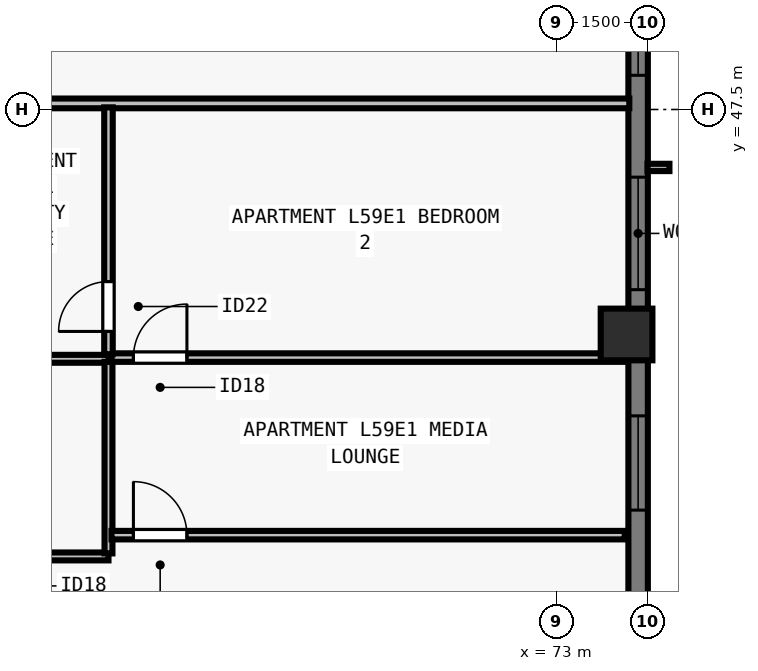
"""IFC4 building model, lengths in metres.
Left out: names, types, materials, properties, quantities, classifications, styles, units other than length and angle.
Written with IfcOpenShell. Run it as: python <this file> out.ifc"""

import sys

from ifc_helpers import new_model, si_unit, direction, frame, frame_2d, origin, origin_2d, place, context, subcontext, project, spatial, rectangle, extrude, element, fill, save


model = new_model("IFC4")
c1 = context("Model", 3, precision=1e-05, world=origin(), true_north=direction((0.0, 1.0)))
c2 = subcontext(c1, "Body", "Model", "MODEL_VIEW")
j1 = project(units=[si_unit("LENGTHUNIT", "METRE"), si_unit("PLANEANGLEUNIT", "RADIAN")], contexts=[c1])
p1 = place(None, origin())
s1 = spatial("IfcSite", under=j1, at=p1, CompositionType="ELEMENT")
p2 = place(p1, origin())
s2 = spatial("IfcBuilding", under=s1, at=p2, CompositionType="ELEMENT")
p3 = place(p2, frame((0.0, 0.0, 216.5)))
s3 = spatial("IfcBuildingStorey", under=s2, at=p3, CompositionType="ELEMENT", Elevation=216.5)
p4 = place(p3, frame((74.15, 43.8, 0.0), z_axis=(0.0, 0.0, 1.0), x_axis=(0.0, 1.0, 0.0)))
e1 = element("IfcColumn", 1, at=p4, inside=s3, PredefinedType="COLUMN", context=c2, shape_type="SweptSolid", body=[
    extrude(rectangle(XDim=0.85, YDim=0.85, at=origin_2d()), origin(), (0.0, 0.0, 1.0), 3.5),
])
p5 = place(p3, frame((74.34, 56.5, 0.0), z_axis=(0.0, 0.0, 1.0), x_axis=(0.0, -1.0, 0.0)))
e2 = element("IfcWall", 2, at=p5, inside=s3, PredefinedType="SOLIDWALL", context=c2, shape_type="SweptSolid", body=[
    extrude(rectangle(XDim=34.702, YDim=0.32, at=frame_2d((17.351, 0.0))), origin(), (0.0, 0.0, 1.0), 3.29),
])
p6 = place(p5, frame((6.888, 0.0, 0.8)))
e3 = element("IfcOpeningElement", 3, at=p6, cuts=e2, PredefinedType="OPENING", context=c2, shape_type="SweptSolid", body=[
    extrude(rectangle(XDim=1.55, YDim=1.678, at=frame_2d((0.775, 0.839))), frame((0.0, 0.17, 0.0), z_axis=(0.0, -1.0, 0.0), x_axis=(1.0, 0.0, 0.0)), (0.0, 0.0, 1.0), 0.34),
])
p7 = place(p5, frame((10.113, 0.0, 0.8)))
e4 = element("IfcOpeningElement", 4, at=p7, cuts=e2, PredefinedType="OPENING", context=c2, shape_type="SweptSolid", body=[
    extrude(rectangle(XDim=1.85, YDim=1.678, at=frame_2d((0.925, 0.839))), frame((0.0, 0.17, 0.0), z_axis=(0.0, -1.0, 0.0), x_axis=(1.0, 0.0, 0.0)), (0.0, 0.0, 1.0), 0.34),
])
p8 = place(p5, frame((14.038, 0.0, 0.8)))
e5 = element("IfcOpeningElement", 5, at=p8, cuts=e2, PredefinedType="OPENING", context=c2, shape_type="SweptSolid", body=[
    extrude(rectangle(XDim=1.55, YDim=1.678, at=frame_2d((0.775, 0.839))), frame((0.0, 0.17, 0.0), z_axis=(0.0, -1.0, 0.0), x_axis=(1.0, 0.0, 0.0)), (0.0, 0.0, 1.0), 0.34),
])
p9 = place(p5, frame((18.114, 0.0, 0.8)))
e6 = element("IfcOpeningElement", 6, at=p9, cuts=e2, PredefinedType="OPENING", context=c2, shape_type="SweptSolid", body=[
    extrude(rectangle(XDim=1.85, YDim=1.678, at=frame_2d((0.925, 0.839))), frame((0.0, 0.17, 0.0), z_axis=(0.0, -1.0, 0.0), x_axis=(1.0, 0.0, 0.0)), (0.0, 0.0, 1.0), 0.34),
])
p10 = place(p5, frame((23.614, 0.0, 0.8)))
e7 = element("IfcOpeningElement", 7, at=p10, cuts=e2, PredefinedType="OPENING", context=c2, shape_type="SweptSolid", body=[
    extrude(rectangle(XDim=1.85, YDim=1.678, at=frame_2d((0.925, 0.839))), frame((0.0, 0.17, 0.0), z_axis=(0.0, -1.0, 0.0), x_axis=(1.0, 0.0, 0.0)), (0.0, 0.0, 1.0), 0.34),
])
p11 = place(p5, frame((29.24, 0.0, 0.8)))
e8 = element("IfcOpeningElement", 8, at=p11, cuts=e2, PredefinedType="OPENING", context=c2, shape_type="SweptSolid", body=[
    extrude(rectangle(XDim=1.55, YDim=1.678, at=frame_2d((0.775, 0.839))), frame((0.0, 0.17, 0.0), z_axis=(0.0, -1.0, 0.0), x_axis=(1.0, 0.0, 0.0)), (0.0, 0.0, 1.0), 0.34),
])
p12 = place(p3, frame((62.865, 47.6, 0.0), z_axis=(0.0, 0.0, 1.0), x_axis=(1.0, 0.0, 0.0)))
e9 = element("IfcWall", 9, at=p12, inside=s3, PredefinedType="PARTITIONING", context=c2, shape_type="SweptSolid", body=[
    extrude(rectangle(XDim=11.33, YDim=0.16, at=frame_2d((5.665, 0.0))), origin(), (0.0, 0.0, 1.0), 3.29),
])
p13 = place(p3, frame((62.88, 43.4, 0.0), z_axis=(0.0, 0.0, 1.0), x_axis=(1.0, 0.0, 0.0)))
e10 = element("IfcWall", 10, at=p13, inside=s3, PredefinedType="PLUMBINGWALL", context=c2, shape_type="SweptSolid", body=[
    extrude(rectangle(XDim=2.75, YDim=0.13, at=frame_2d((1.375, 0.0))), origin(), (0.0, 0.0, 1.0), 3.29),
])
p14 = place(p3, frame((62.88, 40.15, 0.0), z_axis=(0.0, 0.0, 1.0), x_axis=(1.0, 0.0, 0.0)))
e11 = element("IfcWall", 11, at=p14, inside=s3, PredefinedType="PLUMBINGWALL", context=c2, shape_type="SweptSolid", body=[
    extrude(rectangle(XDim=2.75, YDim=0.13, at=frame_2d((1.375, 0.0))), origin(), (0.0, 0.0, 1.0), 3.29),
])
p15 = place(p14, frame((0.55, 0.0, 0.0)))
e12 = element("IfcOpeningElement", 12, at=p15, cuts=e11, PredefinedType="OPENING", context=c2, shape_type="SweptSolid", body=[
    extrude(rectangle(XDim=0.88, YDim=2.1, at=frame_2d((0.44, 1.05))), frame((0.0, 0.075, 0.0), z_axis=(0.0, -1.0, 0.0), x_axis=(1.0, 0.0, 0.0)), (0.0, 0.0, 1.0), 0.15),
])
p16 = place(p3, frame((65.63, 40.2, 0.0), z_axis=(0.0, 0.0, 1.0), x_axis=(0.0, 1.0, 0.0)))
e13 = element("IfcWall", 13, at=p16, inside=s3, PredefinedType="PLUMBINGWALL", context=c2, shape_type="SweptSolid", body=[
    extrude(rectangle(XDim=3.15, YDim=0.13, at=frame_2d((1.575, 0.0))), origin(), (0.0, 0.0, 1.0), 3.29),
])
p17 = place(p3, frame((65.68, 43.42, 0.0), z_axis=(0.0, 0.0, 1.0), x_axis=(1.0, 0.0, 0.0)))
e14 = element("IfcWall", 14, at=p17, inside=s3, PredefinedType="PARTITIONING", context=c2, shape_type="SweptSolid", body=[
    extrude(rectangle(XDim=8.44, YDim=0.14, at=frame_2d((4.22, 0.0))), origin(), (0.0, 0.0, 1.0), 3.29),
])
p18 = place(p17, frame((0.36, 0.0, 0.0)))
e15 = element("IfcOpeningElement", 15, at=p18, cuts=e14, PredefinedType="OPENING", context=c2, shape_type="SweptSolid", body=[
    extrude(rectangle(XDim=0.88, YDim=2.1, at=frame_2d((0.44, 1.05))), frame((0.0, 0.08, 0.0), z_axis=(0.0, -1.0, 0.0), x_axis=(1.0, 0.0, 0.0)), (0.0, 0.0, 1.0), 0.16),
])
p19 = place(p3, frame((65.63, 43.475, 0.0), z_axis=(0.0, 0.0, 1.0), x_axis=(0.0, 1.0, 0.0)))
e16 = element("IfcWall", 16, at=p19, inside=s3, PredefinedType="PARTITIONING", context=c2, shape_type="SweptSolid", body=[
    extrude(rectangle(XDim=4.06, YDim=0.14, at=frame_2d((2.03, 0.0))), origin(), (0.0, 0.0, 1.0), 3.29),
])
p20 = place(p19, frame((0.375, 0.0, 0.0)))
e17 = element("IfcOpeningElement", 17, at=p20, cuts=e16, PredefinedType="OPENING", context=c2, shape_type="SweptSolid", body=[
    extrude(rectangle(XDim=0.82, YDim=2.1, at=frame_2d((0.41, 1.05))), frame((0.0, 0.08, 0.0), z_axis=(0.0, -1.0, 0.0), x_axis=(1.0, 0.0, 0.0)), (0.0, 0.0, 1.0), 0.16),
])
p21 = place(p3, frame((65.68, 40.5, 0.0), z_axis=(0.0, 0.0, 1.0), x_axis=(1.0, 0.0, 0.0)))
e18 = element("IfcWall", 18, at=p21, inside=s3, PredefinedType="PARTITIONING", context=c2, shape_type="SweptSolid", body=[
    extrude(rectangle(XDim=8.44, YDim=0.14, at=frame_2d((4.22, 0.0))), origin(), (0.0, 0.0, 1.0), 3.29),
])
p22 = place(p21, frame((0.36, 0.0, 0.0)))
e19 = element("IfcOpeningElement", 19, at=p22, cuts=e18, PredefinedType="OPENING", context=c2, shape_type="SweptSolid", body=[
    extrude(rectangle(XDim=0.88, YDim=2.1, at=frame_2d((0.44, 1.05))), frame((0.0, 0.08, 0.0), z_axis=(0.0, -1.0, 0.0), x_axis=(1.0, 0.0, 0.0)), (0.0, 0.0, 1.0), 0.16),
])
p23 = place(p6, origin())
e20 = element("IfcWindow", 20, at=p23, inside=s3, PartitioningType="SINGLE_PANEL", PredefinedType="WINDOW", context=c2, shape_type="SweptSolid", body=[
    extrude(rectangle(XDim=1.55, YDim=1.678, at=frame_2d((0.775, 0.839))), frame((0.0, -0.05, 0.0), z_axis=(0.0, -1.0, 0.0), x_axis=(1.0, 0.0, 0.0)), (0.0, 0.0, 1.0), 0.06),
])
fill(e3, e20)
p24 = place(p7, origin())
e21 = element("IfcWindow", 21, at=p24, inside=s3, PartitioningType="SINGLE_PANEL", PredefinedType="WINDOW", context=c2, shape_type="SweptSolid", body=[
    extrude(rectangle(XDim=1.85, YDim=1.678, at=frame_2d((0.925, 0.839))), frame((0.0, -0.05, 0.0), z_axis=(0.0, -1.0, 0.0), x_axis=(1.0, 0.0, 0.0)), (0.0, 0.0, 1.0), 0.06),
])
fill(e4, e21)
p25 = place(p8, origin())
e22 = element("IfcWindow", 22, at=p25, inside=s3, PartitioningType="SINGLE_PANEL", PredefinedType="WINDOW", context=c2, shape_type="SweptSolid", body=[
    extrude(rectangle(XDim=1.55, YDim=1.678, at=frame_2d((0.775, 0.839))), frame((0.0, -0.05, 0.0), z_axis=(0.0, -1.0, 0.0), x_axis=(1.0, 0.0, 0.0)), (0.0, 0.0, 1.0), 0.06),
])
fill(e5, e22)
p26 = place(p20, origin())
e23 = element("IfcDoor", 23, at=p26, inside=s3, OperationType="SINGLE_SWING_LEFT", PredefinedType="DOOR", context=c2, shape_type="SweptSolid", body=[
    extrude(rectangle(XDim=0.82, YDim=2.1, at=frame_2d((0.41, 1.05))), frame((0.0, 0.025, 0.0), z_axis=(0.0, -1.0, 0.0), x_axis=(1.0, 0.0, 0.0)), (0.0, 0.0, 1.0), 0.05),
])
fill(e17, e23)
p27 = place(p18, origin())
e24 = element("IfcDoor", 24, at=p27, inside=s3, OperationType="SINGLE_SWING_RIGHT", PredefinedType="DOOR", context=c2, shape_type="SweptSolid", body=[
    extrude(rectangle(XDim=0.88, YDim=2.1, at=frame_2d((0.44, 1.05))), frame((0.0, 0.025, 0.0), z_axis=(0.0, -1.0, 0.0), x_axis=(1.0, 0.0, 0.0)), (0.0, 0.0, 1.0), 0.05),
])
fill(e15, e24)
p28 = place(p22, origin())
e25 = element("IfcDoor", 25, at=p28, inside=s3, OperationType="SINGLE_SWING_LEFT", PredefinedType="DOOR", context=c2, shape_type="SweptSolid", body=[
    extrude(rectangle(XDim=0.88, YDim=2.1, at=frame_2d((0.44, 1.05))), frame((0.0, 0.025, 0.0), z_axis=(0.0, -1.0, 0.0), x_axis=(1.0, 0.0, 0.0)), (0.0, 0.0, 1.0), 0.05),
])
fill(e19, e25)
save(model, sys.argv[1])
